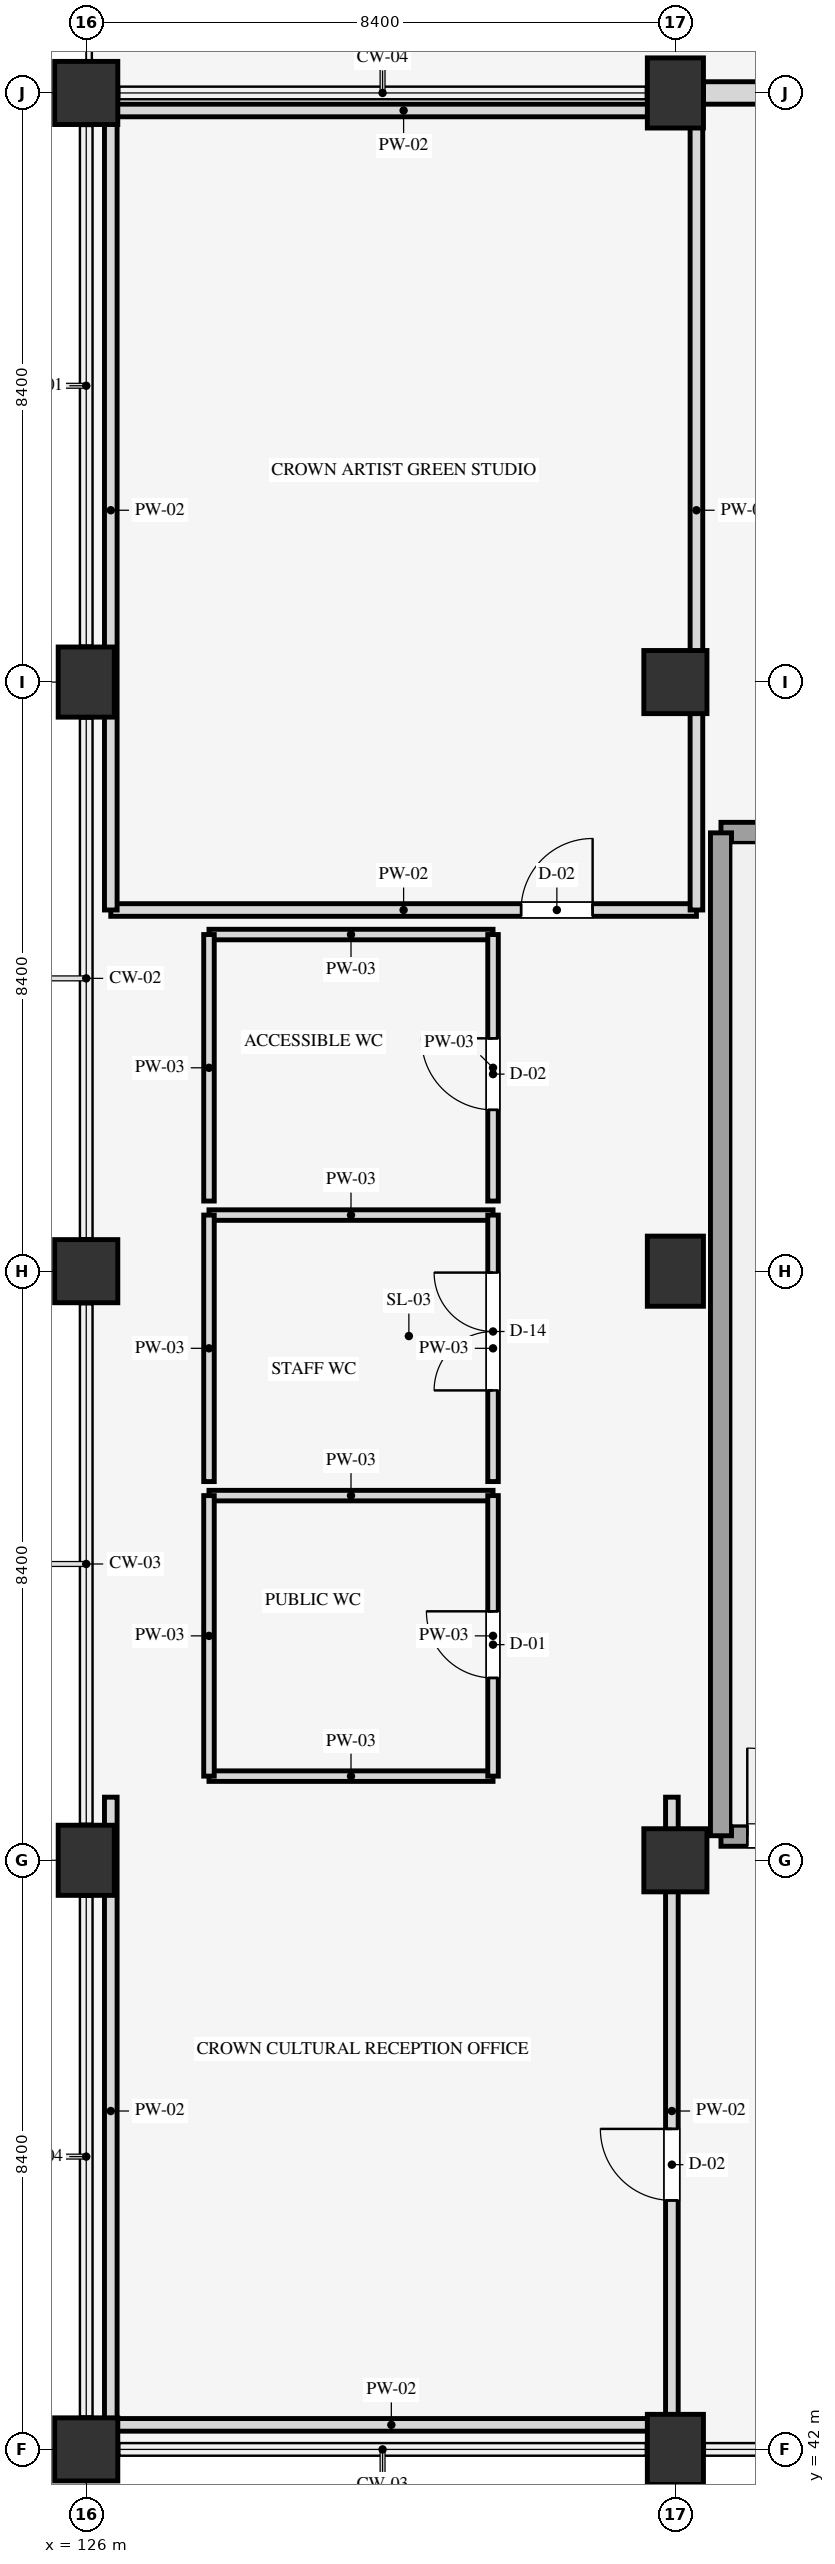
"""IFC4 building model, lengths in metres.
Left out: names, types, materials, properties, quantities, classifications, styles, units other than length and angle.
Written with IfcOpenShell. Run it as: python <this file> out.ifc"""

import sys

from ifc_helpers import new_model, si_unit, direction, frame, frame_2d, origin, origin_2d, place, context, subcontext, project, spatial, rectangle, extrude, element, fill, save


model = new_model("IFC4")
c1 = context("Model", 3, precision=1e-05, world=origin(), true_north=direction((0.0, 1.0)))
c2 = subcontext(c1, "Body", "Model", "MODEL_VIEW")
j1 = project(units=[si_unit("LENGTHUNIT", "METRE"), si_unit("PLANEANGLEUNIT", "RADIAN")], contexts=[c1])
p1 = place(None, origin())
s1 = spatial("IfcSite", under=j1, at=p1, CompositionType="ELEMENT")
p2 = place(p1, origin())
s2 = spatial("IfcBuilding", under=s1, at=p2, CompositionType="ELEMENT")
p3 = place(p2, frame((0.0, 0.0, 69.9)))
s3 = spatial("IfcBuildingStorey", under=s2, at=p3, CompositionType="ELEMENT", Elevation=69.9)
p4 = place(p3, frame((126.0, 42.0, 0.0), z_axis=(0.0, 0.0, 1.0), x_axis=(1.0, 0.0, 0.0)))
e1 = element("IfcColumn", 1, at=p4, inside=s3, PredefinedType="COLUMN", context=c2, shape_type="SweptSolid", body=[
    extrude(rectangle(XDim=0.9, YDim=0.9, at=origin_2d()), origin(), (0.0, 0.0, 1.0), 4.5),
])
p5 = place(p3, frame((126.0, 50.4, 0.0), z_axis=(0.0, 0.0, 1.0), x_axis=(1.0, 0.0, 0.0)))
e2 = element("IfcColumn", 2, at=p5, inside=s3, PredefinedType="COLUMN", context=c2, shape_type="SweptSolid", body=[
    extrude(rectangle(XDim=0.8, YDim=1.0, at=origin_2d()), origin(), (0.0, 0.0, 1.0), 4.5),
])
p6 = place(p3, frame((126.0, 58.8, 0.0), z_axis=(0.0, 0.0, 1.0), x_axis=(1.0, 0.0, 0.0)))
e3 = element("IfcColumn", 3, at=p6, inside=s3, PredefinedType="COLUMN", context=c2, shape_type="SweptSolid", body=[
    extrude(rectangle(XDim=0.9, YDim=0.9, at=origin_2d()), origin(), (0.0, 0.0, 1.0), 4.5),
])
p7 = place(p3, frame((126.0, 67.2, 0.0), z_axis=(0.0, 0.0, 1.0), x_axis=(1.0, 0.0, 0.0)))
e4 = element("IfcColumn", 4, at=p7, inside=s3, PredefinedType="COLUMN", context=c2, shape_type="SweptSolid", body=[
    extrude(rectangle(XDim=0.8, YDim=1.0, at=origin_2d()), origin(), (0.0, 0.0, 1.0), 4.5),
])
p8 = place(p3, frame((126.0, 75.6, 0.0), z_axis=(0.0, 0.0, 1.0), x_axis=(1.0, 0.0, 0.0)))
e5 = element("IfcColumn", 5, at=p8, inside=s3, PredefinedType="COLUMN", context=c2, shape_type="SweptSolid", body=[
    extrude(rectangle(XDim=0.9, YDim=0.9, at=origin_2d()), origin(), (0.0, 0.0, 1.0), 4.5),
])
p9 = place(p3, frame((134.4, 42.0, 0.0), z_axis=(0.0, 0.0, 1.0), x_axis=(1.0, 0.0, 0.0)))
e6 = element("IfcColumn", 6, at=p9, inside=s3, PredefinedType="COLUMN", context=c2, shape_type="SweptSolid", body=[
    extrude(rectangle(XDim=0.8, YDim=1.0, at=origin_2d()), origin(), (0.0, 0.0, 1.0), 4.5),
])
p10 = place(p3, frame((134.4, 50.4, 0.0), z_axis=(0.0, 0.0, 1.0), x_axis=(1.0, 0.0, 0.0)))
e7 = element("IfcColumn", 7, at=p10, inside=s3, PredefinedType="COLUMN", context=c2, shape_type="SweptSolid", body=[
    extrude(rectangle(XDim=0.9, YDim=0.9, at=origin_2d()), origin(), (0.0, 0.0, 1.0), 4.5),
])
p11 = place(p3, frame((134.4, 58.8, 0.0), z_axis=(0.0, 0.0, 1.0), x_axis=(1.0, 0.0, 0.0)))
e8 = element("IfcColumn", 8, at=p11, inside=s3, PredefinedType="COLUMN", context=c2, shape_type="SweptSolid", body=[
    extrude(rectangle(XDim=0.8, YDim=1.0, at=origin_2d()), origin(), (0.0, 0.0, 1.0), 4.5),
])
p12 = place(p3, frame((134.4, 67.2, 0.0), z_axis=(0.0, 0.0, 1.0), x_axis=(1.0, 0.0, 0.0)))
e9 = element("IfcColumn", 9, at=p12, inside=s3, PredefinedType="COLUMN", context=c2, shape_type="SweptSolid", body=[
    extrude(rectangle(XDim=0.9, YDim=0.9, at=origin_2d()), origin(), (0.0, 0.0, 1.0), 4.5),
])
p13 = place(p3, frame((134.4, 75.6, 0.0), z_axis=(0.0, 0.0, 1.0), x_axis=(1.0, 0.0, 0.0)))
e10 = element("IfcColumn", 10, at=p13, inside=s3, PredefinedType="COLUMN", context=c2, shape_type="SweptSolid", body=[
    extrude(rectangle(XDim=0.8, YDim=1.0, at=origin_2d()), origin(), (0.0, 0.0, 1.0), 4.5),
])
p14 = place(p3, frame((142.35, 75.6, 0.0), z_axis=(0.0, 0.0, 1.0), x_axis=(-1.0, 0.0, 0.0)))
e11 = element("IfcWall", 11, at=p14, inside=s3, PredefinedType="STANDARD", context=c2, shape_type="SweptSolid", body=[
    extrude(rectangle(XDim=7.55, YDim=0.32, at=frame_2d((3.775, 0.0))), origin(), (0.0, 0.0, 1.0), 3.68),
])
p15 = place(p14, frame((2.95, 0.0, 0.0)))
e12 = element("IfcOpeningElement", 12, at=p15, cuts=e11, PredefinedType="OPENING", context=c2, shape_type="SweptSolid", body=[
    extrude(rectangle(XDim=1.65, YDim=2.2, at=frame_2d((0.825, 1.1))), frame((0.0, 0.17, 0.0), z_axis=(0.0, -1.0, 0.0), x_axis=(1.0, 0.0, 0.0)), (0.0, 0.0, 1.0), 0.34),
])
p16 = place(p3, frame((135.05, 50.75, 0.0), z_axis=(0.0, 0.0, 1.0), x_axis=(1.0, 0.0, 0.0)))
e13 = element("IfcWall", 13, at=p16, inside=s3, PredefinedType="SHEAR", context=c2, shape_type="SweptSolid", body=[
    extrude(rectangle(XDim=4.0, YDim=0.3, at=frame_2d((2.0, 0.0))), origin(), (0.0, 0.0, 1.0), 4.5),
])
p17 = place(p16, frame((0.375, 0.0, 0.0)))
e14 = element("IfcOpeningElement", 14, at=p17, cuts=e13, PredefinedType="OPENING", context=c2, shape_type="SweptSolid", body=[
    extrude(rectangle(XDim=1.25, YDim=2.15, at=frame_2d((0.625, 1.075))), frame((0.0, 0.16, 0.0), z_axis=(0.0, -1.0, 0.0), x_axis=(1.0, 0.0, 0.0)), (0.0, 0.0, 1.0), 0.32),
])
p18 = place(p3, frame((135.05, 65.05, 0.0), z_axis=(0.0, 0.0, 1.0), x_axis=(1.0, 0.0, 0.0)))
e15 = element("IfcWall", 15, at=p18, inside=s3, PredefinedType="SHEAR", context=c2, shape_type="SweptSolid", body=[
    extrude(rectangle(XDim=4.0, YDim=0.3, at=frame_2d((2.0, 0.0))), origin(), (0.0, 0.0, 1.0), 4.5),
])
p19 = place(p3, frame((135.05, 50.75, 0.0), z_axis=(0.0, 0.0, 1.0), x_axis=(0.0, 1.0, 0.0)))
e16 = element("IfcWall", 16, at=p19, inside=s3, PredefinedType="SHEAR", context=c2, shape_type="SweptSolid", body=[
    extrude(rectangle(XDim=14.3, YDim=0.3, at=frame_2d((7.15, 0.0))), origin(), (0.0, 0.0, 1.0), 4.5),
])
for number, where, z_axis, x_axis in (
    (17, (127.75, 51.6, 0.0), (0.0, 0.0, 1.0), (1.0, 0.0, 0.0)),
    (18, (127.75, 55.6, 0.0), (0.0, 0.0, 1.0), (1.0, 0.0, 0.0)),
):
    element("IfcWall", number, at=place(p3, frame(where, z_axis=z_axis, x_axis=x_axis)), inside=s3, PredefinedType="PARTITIONING", context=c2, shape_type="SweptSolid", body=[
        extrude(rectangle(XDim=4.05, YDim=0.15, at=frame_2d((2.025, 0.0))), origin(), (0.0, 0.0, 1.0), 3.54),
    ])
p20 = place(p3, frame((127.75, 51.6, 0.0), z_axis=(0.0, 0.0, 1.0), x_axis=(0.0, 1.0, 0.0)))
e19 = element("IfcWall", 19, at=p20, inside=s3, PredefinedType="PARTITIONING", context=c2, shape_type="SweptSolid", body=[
    extrude(rectangle(XDim=4.0, YDim=0.15, at=frame_2d((2.0, 0.0))), origin(), (0.0, 0.0, 1.0), 3.54),
])
p21 = place(p3, frame((131.8, 51.6, 0.0), z_axis=(0.0, 0.0, 1.0), x_axis=(0.0, 1.0, 0.0)))
e20 = element("IfcWall", 20, at=p21, inside=s3, PredefinedType="PARTITIONING", context=c2, shape_type="SweptSolid", body=[
    extrude(rectangle(XDim=4.0, YDim=0.15, at=frame_2d((2.0, 0.0))), origin(), (0.0, 0.0, 1.0), 3.54),
])
p22 = place(p21, frame((1.4, 0.0, 0.0)))
e21 = element("IfcOpeningElement", 21, at=p22, cuts=e20, PredefinedType="OPENING", context=c2, shape_type="SweptSolid", body=[
    extrude(rectangle(XDim=0.95, YDim=2.1, at=frame_2d((0.475, 1.05))), frame((0.0, 0.085, 0.0), z_axis=(0.0, -1.0, 0.0), x_axis=(1.0, 0.0, 0.0)), (0.0, 0.0, 1.0), 0.17),
])
p23 = place(p3, frame((127.75, 59.6, 0.0), z_axis=(0.0, 0.0, 1.0), x_axis=(1.0, 0.0, 0.0)))
e22 = element("IfcWall", 22, at=p23, inside=s3, PredefinedType="PARTITIONING", context=c2, shape_type="SweptSolid", body=[
    extrude(rectangle(XDim=4.05, YDim=0.15, at=frame_2d((2.025, 0.0))), origin(), (0.0, 0.0, 1.0), 3.54),
])
p24 = place(p3, frame((127.75, 55.8, 0.0), z_axis=(0.0, 0.0, 1.0), x_axis=(0.0, 1.0, 0.0)))
e23 = element("IfcWall", 23, at=p24, inside=s3, PredefinedType="PARTITIONING", context=c2, shape_type="SweptSolid", body=[
    extrude(rectangle(XDim=3.8, YDim=0.15, at=frame_2d((1.9, 0.0))), origin(), (0.0, 0.0, 1.0), 3.54),
])
p25 = place(p3, frame((131.8, 55.8, 0.0), z_axis=(0.0, 0.0, 1.0), x_axis=(0.0, 1.0, 0.0)))
e24 = element("IfcWall", 24, at=p25, inside=s3, PredefinedType="PARTITIONING", context=c2, shape_type="SweptSolid", body=[
    extrude(rectangle(XDim=3.8, YDim=0.15, at=frame_2d((1.9, 0.0))), origin(), (0.0, 0.0, 1.0), 3.54),
])
p26 = place(p25, frame((1.3, 0.0, 0.0)))
e25 = element("IfcOpeningElement", 25, at=p26, cuts=e24, PredefinedType="OPENING", context=c2, shape_type="SweptSolid", body=[
    extrude(rectangle(XDim=1.68, YDim=2.24, at=frame_2d((0.84, 1.12))), frame((0.0, 0.085, 0.0), z_axis=(0.0, -1.0, 0.0), x_axis=(1.0, 0.0, 0.0)), (0.0, 0.0, 1.0), 0.17),
])
p27 = place(p3, frame((127.75, 63.6, 0.0), z_axis=(0.0, 0.0, 1.0), x_axis=(1.0, 0.0, 0.0)))
e26 = element("IfcWall", 26, at=p27, inside=s3, PredefinedType="PARTITIONING", context=c2, shape_type="SweptSolid", body=[
    extrude(rectangle(XDim=4.05, YDim=0.15, at=frame_2d((2.025, 0.0))), origin(), (0.0, 0.0, 1.0), 3.54),
])
p28 = place(p3, frame((127.75, 59.8, 0.0), z_axis=(0.0, 0.0, 1.0), x_axis=(0.0, 1.0, 0.0)))
e27 = element("IfcWall", 27, at=p28, inside=s3, PredefinedType="PARTITIONING", context=c2, shape_type="SweptSolid", body=[
    extrude(rectangle(XDim=3.8, YDim=0.15, at=frame_2d((1.9, 0.0))), origin(), (0.0, 0.0, 1.0), 3.54),
])
p29 = place(p3, frame((131.8, 59.8, 0.0), z_axis=(0.0, 0.0, 1.0), x_axis=(0.0, 1.0, 0.0)))
e28 = element("IfcWall", 28, at=p29, inside=s3, PredefinedType="PARTITIONING", context=c2, shape_type="SweptSolid", body=[
    extrude(rectangle(XDim=3.8, YDim=0.15, at=frame_2d((1.9, 0.0))), origin(), (0.0, 0.0, 1.0), 3.54),
])
p30 = place(p29, frame((1.3, 0.0, 0.0)))
e29 = element("IfcOpeningElement", 29, at=p30, cuts=e28, PredefinedType="OPENING", context=c2, shape_type="SweptSolid", body=[
    extrude(rectangle(XDim=1.02, YDim=2.1, at=frame_2d((0.51, 1.05))), frame((0.0, 0.085, 0.0), z_axis=(0.0, -1.0, 0.0), x_axis=(1.0, 0.0, 0.0)), (0.0, 0.0, 1.0), 0.17),
])
p31 = place(p3, frame((126.35, 42.35, 0.0), z_axis=(0.0, 0.0, 1.0), x_axis=(1.0, 0.0, 0.0)))
e30 = element("IfcWall", 30, at=p31, inside=s3, PredefinedType="PARTITIONING", context=c2, shape_type="SweptSolid", body=[
    extrude(rectangle(XDim=8.0, YDim=0.18, at=frame_2d((4.0, 0.0))), origin(), (0.0, 0.0, 1.0), 3.54),
])
p32 = place(p3, frame((126.35, 42.35, 0.0), z_axis=(0.0, 0.0, 1.0), x_axis=(0.0, 1.0, 0.0)))
e31 = element("IfcWall", 31, at=p32, inside=s3, PredefinedType="PARTITIONING", context=c2, shape_type="SweptSolid", body=[
    extrude(rectangle(XDim=8.95, YDim=0.18, at=frame_2d((4.475, 0.0))), origin(), (0.0, 0.0, 1.0), 3.54),
])
p33 = place(p3, frame((134.35, 42.35, 0.0), z_axis=(0.0, 0.0, 1.0), x_axis=(0.0, 1.0, 0.0)))
e32 = element("IfcWall", 32, at=p33, inside=s3, PredefinedType="PARTITIONING", context=c2, shape_type="SweptSolid", body=[
    extrude(rectangle(XDim=8.95, YDim=0.18, at=frame_2d((4.475, 0.0))), origin(), (0.0, 0.0, 1.0), 3.54),
])
p34 = place(p33, frame((3.2, 0.0, 0.0)))
e33 = element("IfcOpeningElement", 33, at=p34, cuts=e32, PredefinedType="OPENING", context=c2, shape_type="SweptSolid", body=[
    extrude(rectangle(XDim=1.02, YDim=2.1, at=frame_2d((0.51, 1.05))), frame((0.0, 0.1, 0.0), z_axis=(0.0, -1.0, 0.0), x_axis=(1.0, 0.0, 0.0)), (0.0, 0.0, 1.0), 0.2),
])
p35 = place(p3, frame((126.35, 63.95, 0.0), z_axis=(0.0, 0.0, 1.0), x_axis=(1.0, 0.0, 0.0)))
e34 = element("IfcWall", 34, at=p35, inside=s3, PredefinedType="PARTITIONING", context=c2, shape_type="SweptSolid", body=[
    extrude(rectangle(XDim=8.35, YDim=0.18, at=frame_2d((4.175, 0.0))), origin(), (0.0, 0.0, 1.0), 3.54),
])
p36 = place(p35, frame((5.85, 0.0, 0.0)))
e35 = element("IfcOpeningElement", 35, at=p36, cuts=e34, PredefinedType="OPENING", context=c2, shape_type="SweptSolid", body=[
    extrude(rectangle(XDim=1.02, YDim=2.1, at=frame_2d((0.51, 1.05))), frame((0.0, 0.1, 0.0), z_axis=(0.0, -1.0, 0.0), x_axis=(1.0, 0.0, 0.0)), (0.0, 0.0, 1.0), 0.2),
])
p37 = place(p3, frame((126.35, 75.35, 0.0), z_axis=(0.0, 0.0, 1.0), x_axis=(1.0, 0.0, 0.0)))
e36 = element("IfcWall", 36, at=p37, inside=s3, PredefinedType="PARTITIONING", context=c2, shape_type="SweptSolid", body=[
    extrude(rectangle(XDim=8.35, YDim=0.18, at=frame_2d((4.175, 0.0))), origin(), (0.0, 0.0, 1.0), 3.54),
])
for number, where, z_axis, x_axis in (
    (37, (126.35, 63.95, 0.0), (0.0, 0.0, 1.0), (0.0, 1.0, 0.0)),
    (38, (134.7, 63.95, 0.0), (0.0, 0.0, 1.0), (0.0, 1.0, 0.0)),
):
    element("IfcWall", number, at=place(p3, frame(where, z_axis=z_axis, x_axis=x_axis)), inside=s3, PredefinedType="PARTITIONING", context=c2, shape_type="SweptSolid", body=[
        extrude(rectangle(XDim=11.4, YDim=0.18, at=frame_2d((5.7, 0.0))), origin(), (0.0, 0.0, 1.0), 3.54),
    ])
p38 = place(p17, origin())
e39 = element("IfcDoor", 39, at=p38, inside=s3, OperationType="SINGLE_SWING_LEFT", PredefinedType="DOOR", context=c2, shape_type="SweptSolid", body=[
    extrude(rectangle(XDim=1.25, YDim=2.15, at=frame_2d((0.625, 1.075))), frame((0.0, 0.025, 0.0), z_axis=(0.0, -1.0, 0.0), x_axis=(1.0, 0.0, 0.0)), (0.0, 0.0, 1.0), 0.05),
])
fill(e14, e39)
p39 = place(p22, origin())
e40 = element("IfcDoor", 40, at=p39, inside=s3, OperationType="SINGLE_SWING_RIGHT", PredefinedType="DOOR", context=c2, shape_type="SweptSolid", body=[
    extrude(rectangle(XDim=0.95, YDim=2.1, at=frame_2d((0.475, 1.05))), frame((0.0, 0.025, 0.0), z_axis=(0.0, -1.0, 0.0), x_axis=(1.0, 0.0, 0.0)), (0.0, 0.0, 1.0), 0.05),
])
fill(e21, e40)
p40 = place(p26, origin())
e41 = element("IfcDoor", 41, at=p40, inside=s3, OperationType="DOUBLE_DOOR_SINGLE_SWING", PredefinedType="DOOR", context=c2, shape_type="SweptSolid", body=[
    extrude(rectangle(XDim=1.68, YDim=2.24, at=frame_2d((0.84, 1.12))), frame((0.0, 0.025, 0.0), z_axis=(0.0, -1.0, 0.0), x_axis=(1.0, 0.0, 0.0)), (0.0, 0.0, 1.0), 0.05),
])
fill(e25, e41)
p41 = place(p30, origin())
e42 = element("IfcDoor", 42, at=p41, inside=s3, OperationType="SINGLE_SWING_RIGHT", PredefinedType="DOOR", context=c2, shape_type="SweptSolid", body=[
    extrude(rectangle(XDim=1.02, YDim=2.1, at=frame_2d((0.51, 1.05))), frame((0.0, 0.025, 0.0), z_axis=(0.0, -1.0, 0.0), x_axis=(1.0, 0.0, 0.0)), (0.0, 0.0, 1.0), 0.05),
])
fill(e29, e42)
p42 = place(p34, origin())
e43 = element("IfcDoor", 43, at=p42, inside=s3, OperationType="SINGLE_SWING_RIGHT", PredefinedType="DOOR", context=c2, shape_type="SweptSolid", body=[
    extrude(rectangle(XDim=1.02, YDim=2.1, at=frame_2d((0.51, 1.05))), frame((0.0, 0.025, 0.0), z_axis=(0.0, -1.0, 0.0), x_axis=(1.0, 0.0, 0.0)), (0.0, 0.0, 1.0), 0.05),
])
fill(e33, e43)
p43 = place(p36, origin())
e44 = element("IfcDoor", 44, at=p43, inside=s3, OperationType="SINGLE_SWING_RIGHT", PredefinedType="DOOR", context=c2, shape_type="SweptSolid", body=[
    extrude(rectangle(XDim=1.02, YDim=2.1, at=frame_2d((0.51, 1.05))), frame((0.0, 0.025, 0.0), z_axis=(0.0, -1.0, 0.0), x_axis=(1.0, 0.0, 0.0)), (0.0, 0.0, 1.0), 0.05),
])
fill(e35, e44)
save(model, sys.argv[1])
